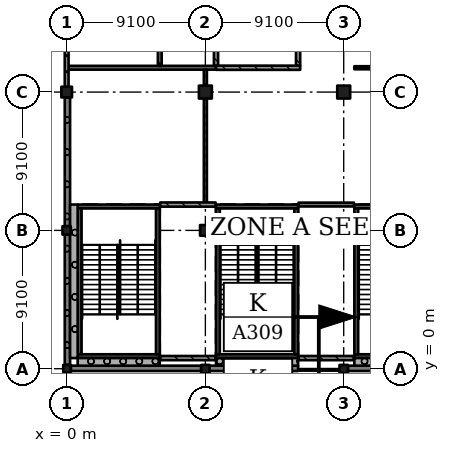
"""IFC4 building model, lengths in metres.
Left out: names, types, materials, properties, quantities, classifications, styles, units other than length and angle.
Written with IfcOpenShell. Run it as: python <this file> out.ifc"""

import sys

from ifc_helpers import new_model, si_unit, direction, frame, frame_2d, origin, origin_with_axes, origin_2d, place, context, subcontext, project, spatial, rectangle, extrude, element, fill, save


model = new_model("IFC4")
c1 = context("Model", 3, precision=1e-05, world=origin(), true_north=direction((0.0, 1.0)))
c2 = subcontext(c1, "Body", "Model", "MODEL_VIEW")
j1 = project(units=[si_unit("LENGTHUNIT", "METRE"), si_unit("PLANEANGLEUNIT", "RADIAN")], contexts=[c1])
p1 = place(None, origin())
s1 = spatial("IfcSite", under=j1, at=p1, CompositionType="ELEMENT")
p2 = place(p1, origin())
s2 = spatial("IfcBuilding", under=s1, at=p2, CompositionType="ELEMENT")
p3 = place(p2, frame((0.0, 0.0, 6.37)))
s3 = spatial("IfcBuildingStorey", under=s2, at=p3, CompositionType="ELEMENT", Elevation=6.37)
p4 = place(p3, origin_with_axes())
e1 = element("IfcColumn", 1, at=p4, inside=s3, PredefinedType="COLUMN", context=c2, shape_type="SweptSolid", body=[
    extrude(rectangle(XDim=0.5, YDim=0.5, at=origin_2d()), origin(), (0.0, 0.0, 1.0), 4.55),
])
p5 = place(p3, frame((-0.025, 9.1, 0.0), z_axis=(0.0, 0.0, 1.0), x_axis=(1.0, 0.0, 0.0)))
e2 = element("IfcColumn", 2, at=p5, inside=s3, PredefinedType="COLUMN", context=c2, shape_type="SweptSolid", body=[
    extrude(rectangle(XDim=0.55, YDim=0.55, at=origin_2d()), origin(), (0.0, 0.0, 1.0), 4.55),
])
p6 = place(p3, frame((-0.025, 18.2, 0.0), z_axis=(0.0, 0.0, 1.0), x_axis=(1.0, 0.0, 0.0)))
e3 = element("IfcColumn", 3, at=p6, inside=s3, PredefinedType="COLUMN", context=c2, shape_type="SweptSolid", body=[
    extrude(rectangle(XDim=0.7, YDim=0.7, at=origin_2d()), origin(), (0.0, 0.0, 1.0), 4.55),
])
p7 = place(p3, frame((9.1, -0.025, 0.0), z_axis=(0.0, 0.0, 1.0), x_axis=(1.0, 0.0, 0.0)))
e4 = element("IfcColumn", 4, at=p7, inside=s3, PredefinedType="COLUMN", context=c2, shape_type="SweptSolid", body=[
    extrude(rectangle(XDim=0.55, YDim=0.55, at=origin_2d()), origin(), (0.0, 0.0, 1.0), 4.55),
])
p8 = place(p3, frame((9.1, 9.1, 0.0), z_axis=(0.0, 0.0, 1.0), x_axis=(1.0, 0.0, 0.0)))
e5 = element("IfcColumn", 5, at=p8, inside=s3, PredefinedType="COLUMN", context=c2, shape_type="SweptSolid", body=[
    extrude(rectangle(XDim=0.7, YDim=0.7, at=origin_2d()), origin(), (0.0, 0.0, 1.0), 4.55),
])
p9 = place(p3, frame((9.1, 18.2, 0.0), z_axis=(0.0, 0.0, 1.0), x_axis=(1.0, 0.0, 0.0)))
e6 = element("IfcColumn", 6, at=p9, inside=s3, PredefinedType="COLUMN", context=c2, shape_type="SweptSolid", body=[
    extrude(rectangle(XDim=0.85, YDim=0.85, at=origin_2d()), origin(), (0.0, 0.0, 1.0), 4.55),
])
p10 = place(p3, frame((18.2, -0.025, 0.0), z_axis=(0.0, 0.0, 1.0), x_axis=(1.0, 0.0, 0.0)))
e7 = element("IfcColumn", 7, at=p10, inside=s3, PredefinedType="COLUMN", context=c2, shape_type="SweptSolid", body=[
    extrude(rectangle(XDim=0.55, YDim=0.55, at=origin_2d()), origin(), (0.0, 0.0, 1.0), 4.55),
])
p11 = place(p3, frame((18.2, 9.1, 0.0), z_axis=(0.0, 0.0, 1.0), x_axis=(1.0, 0.0, 0.0)))
e8 = element("IfcColumn", 8, at=p11, inside=s3, PredefinedType="COLUMN", context=c2, shape_type="SweptSolid", body=[
    extrude(rectangle(XDim=0.7, YDim=0.7, at=origin_2d()), origin(), (0.0, 0.0, 1.0), 4.55),
])
p12 = place(p3, frame((18.2, 18.2, 0.0), z_axis=(0.0, 0.0, 1.0), x_axis=(1.0, 0.0, 0.0)))
e9 = element("IfcColumn", 9, at=p12, inside=s3, PredefinedType="COLUMN", context=c2, shape_type="SweptSolid", body=[
    extrude(rectangle(XDim=0.85, YDim=0.85, at=origin_2d()), origin(), (0.0, 0.0, 1.0), 4.55),
])
p13 = place(p3, frame((6.1, 0.825, 0.0), z_axis=(0.0, 0.0, 1.0), x_axis=(-1.0, 0.0, 0.0)))
e10 = element("IfcWall", 10, at=p13, inside=s3, PredefinedType="SHEAR", context=c2, shape_type="SweptSolid", body=[
    extrude(rectangle(XDim=5.4, YDim=0.25, at=frame_2d((2.7, 0.0))), origin(), (0.0, 0.0, 1.0), 4.55),
])
p14 = place(p3, frame((6.1, 10.675, 0.0), z_axis=(0.0, 0.0, 1.0), x_axis=(-1.0, 0.0, 0.0)))
e11 = element("IfcWall", 11, at=p14, inside=s3, PredefinedType="SHEAR", context=c2, shape_type="SweptSolid", body=[
    extrude(rectangle(XDim=5.4, YDim=0.25, at=frame_2d((2.7, 0.0))), origin(), (0.0, 0.0, 1.0), 4.55),
])
p15 = place(p14, frame((1.5, 0.0, 0.0)))
e12 = element("IfcOpeningElement", 12, at=p15, cuts=e11, PredefinedType="OPENING", context=c2, shape_type="SweptSolid", body=[
    extrude(rectangle(XDim=2.4, YDim=2.1, at=frame_2d((1.2, 1.05))), frame((0.0, 0.135, 0.0), z_axis=(0.0, -1.0, 0.0), x_axis=(1.0, 0.0, 0.0)), (0.0, 0.0, 1.0), 0.27),
])
for number, where, z_axis, x_axis in (
    (13, (0.825, 10.55, 0.0), (0.0, 0.0, 1.0), (0.0, -1.0, 0.0)),
    (14, (5.975, 10.55, 0.0), (0.0, 0.0, 1.0), (0.0, -1.0, 0.0)),
):
    element("IfcWall", number, at=place(p3, frame(where, z_axis=z_axis, x_axis=x_axis)), inside=s3, PredefinedType="SHEAR", context=c2, shape_type="SweptSolid", body=[
        extrude(rectangle(XDim=9.6, YDim=0.25, at=frame_2d((4.8, 0.0))), origin(), (0.0, 0.0, 1.0), 4.55),
    ])
p16 = place(p3, frame((15.2, 0.825, 0.0), z_axis=(0.0, 0.0, 1.0), x_axis=(-1.0, 0.0, 0.0)))
e15 = element("IfcWall", 15, at=p16, inside=s3, PredefinedType="SHEAR", context=c2, shape_type="SweptSolid", body=[
    extrude(rectangle(XDim=5.4, YDim=0.25, at=frame_2d((2.7, 0.0))), origin(), (0.0, 0.0, 1.0), 4.55),
])
p17 = place(p3, frame((15.2, 10.675, 0.0), z_axis=(0.0, 0.0, 1.0), x_axis=(-1.0, 0.0, 0.0)))
e16 = element("IfcWall", 16, at=p17, inside=s3, PredefinedType="SHEAR", context=c2, shape_type="SweptSolid", body=[
    extrude(rectangle(XDim=5.4, YDim=0.25, at=frame_2d((2.7, 0.0))), origin(), (0.0, 0.0, 1.0), 4.55),
])
p18 = place(p17, frame((1.5, 0.0, 0.0)))
e17 = element("IfcOpeningElement", 17, at=p18, cuts=e16, PredefinedType="OPENING", context=c2, shape_type="SweptSolid", body=[
    extrude(rectangle(XDim=2.4, YDim=2.1, at=frame_2d((1.2, 1.05))), frame((0.0, 0.135, 0.0), z_axis=(0.0, -1.0, 0.0), x_axis=(1.0, 0.0, 0.0)), (0.0, 0.0, 1.0), 0.27),
])
for number, where, z_axis, x_axis in (
    (18, (9.925, 10.55, 0.0), (0.0, 0.0, 1.0), (0.0, -1.0, 0.0)),
    (19, (15.075, 10.55, 0.0), (0.0, 0.0, 1.0), (0.0, -1.0, 0.0)),
):
    element("IfcWall", number, at=place(p3, frame(where, z_axis=z_axis, x_axis=x_axis)), inside=s3, PredefinedType="SHEAR", context=c2, shape_type="SweptSolid", body=[
        extrude(rectangle(XDim=9.6, YDim=0.25, at=frame_2d((4.8, 0.0))), origin(), (0.0, 0.0, 1.0), 4.55),
    ])
p19 = place(p3, frame((24.3, 0.825, 0.0), z_axis=(0.0, 0.0, 1.0), x_axis=(-1.0, 0.0, 0.0)))
e20 = element("IfcWall", 20, at=p19, inside=s3, PredefinedType="SHEAR", context=c2, shape_type="SweptSolid", body=[
    extrude(rectangle(XDim=5.4, YDim=0.25, at=frame_2d((2.7, 0.0))), origin(), (0.0, 0.0, 1.0), 4.55),
])
p20 = place(p3, frame((24.3, 10.675, 0.0), z_axis=(0.0, 0.0, 1.0), x_axis=(-1.0, 0.0, 0.0)))
e21 = element("IfcWall", 21, at=p20, inside=s3, PredefinedType="SHEAR", context=c2, shape_type="SweptSolid", body=[
    extrude(rectangle(XDim=5.4, YDim=0.25, at=frame_2d((2.7, 0.0))), origin(), (0.0, 0.0, 1.0), 4.55),
])
p21 = place(p20, frame((1.5, 0.0, 0.0)))
e22 = element("IfcOpeningElement", 22, at=p21, cuts=e21, PredefinedType="OPENING", context=c2, shape_type="SweptSolid", body=[
    extrude(rectangle(XDim=2.4, YDim=2.1, at=frame_2d((1.2, 1.05))), frame((0.0, 0.135, 0.0), z_axis=(0.0, -1.0, 0.0), x_axis=(1.0, 0.0, 0.0)), (0.0, 0.0, 1.0), 0.27),
])
p22 = place(p3, frame((19.025, 10.55, 0.0), z_axis=(0.0, 0.0, 1.0), x_axis=(0.0, -1.0, 0.0)))
e23 = element("IfcWall", 23, at=p22, inside=s3, PredefinedType="SHEAR", context=c2, shape_type="SweptSolid", body=[
    extrude(rectangle(XDim=9.6, YDim=0.25, at=frame_2d((4.8, 0.0))), origin(), (0.0, 0.0, 1.0), 4.55),
])
p23 = place(p3, frame((0.25, 0.025, 0.0), z_axis=(0.0, 0.0, 1.0), x_axis=(1.0, 0.0, 0.0)))
e24 = element("IfcWall", 24, at=p23, inside=s3, PredefinedType="SOLIDWALL", context=c2, shape_type="SweptSolid", body=[
    extrude(rectangle(XDim=8.575, YDim=0.35, at=frame_2d((4.288, 0.0))), origin(), (0.0, 0.0, 1.0), 3.5),
])
p24 = place(p3, frame((9.375, 0.025, 0.0), z_axis=(0.0, 0.0, 1.0), x_axis=(1.0, 0.0, 0.0)))
e25 = element("IfcWall", 25, at=p24, inside=s3, PredefinedType="SOLIDWALL", context=c2, shape_type="SweptSolid", body=[
    extrude(rectangle(XDim=5.825, YDim=0.35, at=frame_2d((2.913, 0.0))), origin(), (0.0, 0.0, 1.0), 3.5),
])
p25 = place(p3, frame((18.475, 0.025, 0.0), z_axis=(0.0, 0.0, 1.0), x_axis=(1.0, 0.0, 0.0)))
e26 = element("IfcWall", 26, at=p25, inside=s3, PredefinedType="SOLIDWALL", context=c2, shape_type="SweptSolid", body=[
    extrude(rectangle(XDim=8.5, YDim=0.35, at=frame_2d((4.25, 0.0))), origin(), (0.0, 0.0, 1.0), 3.5),
])
p26 = place(p3, frame((-0.025, 26.95, 0.0), z_axis=(0.0, 0.0, 1.0), x_axis=(0.0, -1.0, 0.0)))
e27 = element("IfcWall", 27, at=p26, inside=s3, PredefinedType="SOLIDWALL", context=c2, shape_type="SweptSolid", body=[
    extrude(rectangle(XDim=8.4, YDim=0.25, at=frame_2d((4.2, 0.0))), origin(), (0.0, 0.0, 1.0), 3.55),
])
p27 = place(p3, frame((0.025, 17.85, 0.0), z_axis=(0.0, 0.0, 1.0), x_axis=(0.0, -1.0, 0.0)))
e28 = element("IfcWall", 28, at=p27, inside=s3, PredefinedType="SOLIDWALL", context=c2, shape_type="SweptSolid", body=[
    extrude(rectangle(XDim=8.475, YDim=0.35, at=frame_2d((4.238, 0.0))), origin(), (0.0, 0.0, 1.0), 3.5),
])
p28 = place(p3, frame((0.025, 8.825, 0.0), z_axis=(0.0, 0.0, 1.0), x_axis=(0.0, -1.0, 0.0)))
e29 = element("IfcWall", 29, at=p28, inside=s3, PredefinedType="SOLIDWALL", context=c2, shape_type="SweptSolid", body=[
    extrude(rectangle(XDim=8.575, YDim=0.35, at=frame_2d((4.288, 0.0))), origin(), (0.0, 0.0, 1.0), 3.5),
])
p29 = place(p3, frame((0.7, 0.45, 0.0), z_axis=(0.0, 0.0, 1.0), x_axis=(1.0, 0.0, 0.0)))
e30 = element("IfcWall", 30, at=p29, inside=s3, PredefinedType="SOLIDWALL", context=c2, shape_type="SweptSolid", body=[
    extrude(rectangle(XDim=5.4, YDim=0.5, at=frame_2d((2.7, 0.0))), origin(), (0.0, 0.0, 1.0), 4.55),
])
p30 = place(p3, frame((0.45, 0.7, 0.0), z_axis=(0.0, 0.0, 1.0), x_axis=(0.0, 1.0, 0.0)))
e31 = element("IfcWall", 31, at=p30, inside=s3, PredefinedType="SOLIDWALL", context=c2, shape_type="SweptSolid", body=[
    extrude(rectangle(XDim=10.1, YDim=0.5, at=frame_2d((5.05, 0.0))), origin(), (0.0, 0.0, 1.0), 4.25),
])
p31 = place(p3, frame((9.8, 0.45, 0.0), z_axis=(0.0, 0.0, 1.0), x_axis=(1.0, 0.0, 0.0)))
e32 = element("IfcWall", 32, at=p31, inside=s3, PredefinedType="SOLIDWALL", context=c2, shape_type="SweptSolid", body=[
    extrude(rectangle(XDim=5.4, YDim=0.5, at=frame_2d((2.7, 0.0))), origin(), (0.0, 0.0, 1.0), 4.55),
])
p32 = place(p3, frame((18.9, 0.45, 0.0), z_axis=(0.0, 0.0, 1.0), x_axis=(1.0, 0.0, 0.0)))
e33 = element("IfcWall", 33, at=p32, inside=s3, PredefinedType="SOLIDWALL", context=c2, shape_type="SweptSolid", body=[
    extrude(rectangle(XDim=5.4, YDim=0.5, at=frame_2d((2.7, 0.0))), origin(), (0.0, 0.0, 1.0), 4.55),
])
p33 = place(p3, frame((0.1, 19.8, 0.0), z_axis=(0.0, 0.0, 1.0), x_axis=(1.0, 0.0, 0.0)))
e34 = element("IfcWall", 34, at=p33, inside=s3, PredefinedType="SOLIDWALL", context=c2, shape_type="SweptSolid", body=[
    extrude(rectangle(XDim=9.7, YDim=0.25, at=frame_2d((4.85, 0.0))), origin(), (0.0, 0.0, 1.0), 4.25),
])
p34 = place(p33, frame((7.05, 0.0, 0.0)))
e35 = element("IfcOpeningElement", 35, at=p34, cuts=e34, PredefinedType="OPENING", context=c2, shape_type="SweptSolid", body=[
    extrude(rectangle(XDim=1.0, YDim=2.1, at=frame_2d((0.5, 1.05))), frame((0.0, 0.135, 0.0), z_axis=(0.0, -1.0, 0.0), x_axis=(1.0, 0.0, 0.0)), (0.0, 0.0, 1.0), 0.27),
])
p35 = place(p33, frame((2.75, 0.0, 0.0)))
e36 = element("IfcOpeningElement", 36, at=p35, cuts=e34, PredefinedType="OPENING", context=c2, shape_type="SweptSolid", body=[
    extrude(rectangle(XDim=1.0, YDim=2.1, at=frame_2d((0.5, 1.05))), frame((0.0, 0.135, 0.0), z_axis=(0.0, -1.0, 0.0), x_axis=(1.0, 0.0, 0.0)), (0.0, 0.0, 1.0), 0.27),
])
p36 = place(p3, frame((6.1, 29.775, 0.0), z_axis=(0.0, 0.0, 1.0), x_axis=(0.0, -1.0, 0.0)))
e37 = element("IfcWall", 37, at=p36, inside=s3, PredefinedType="SOLIDWALL", context=c2, shape_type="SweptSolid", body=[
    extrude(rectangle(XDim=9.85, YDim=0.25, at=frame_2d((4.925, 0.0))), origin(), (0.0, 0.0, 1.0), 4.25),
])
p37 = place(p3, frame((6.13, 10.8, 0.0), z_axis=(0.0, 0.0, 1.0), x_axis=(1.0, 0.0, 0.0)))
e38 = element("IfcWall", 38, at=p37, inside=s3, PredefinedType="SOLIDWALL", context=c2, shape_type="SweptSolid", body=[
    extrude(rectangle(XDim=3.64, YDim=0.275, at=frame_2d((1.82, 0.0))), origin(), (0.0, 0.0, 1.0), 4.25),
])
p38 = place(p37, frame((0.92, 0.0, 0.0)))
e39 = element("IfcOpeningElement", 39, at=p38, cuts=e38, PredefinedType="OPENING", context=c2, shape_type="SweptSolid", body=[
    extrude(rectangle(XDim=1.2, YDim=2.4, at=frame_2d((0.6, 1.2))), frame((0.0, 0.147, 0.0), z_axis=(0.0, -1.0, 0.0), x_axis=(1.0, 0.0, 0.0)), (0.0, 0.0, 1.0), 0.295),
])
p39 = place(p3, frame((9.1, 17.775, 0.0), z_axis=(0.0, 0.0, 1.0), x_axis=(0.0, -1.0, 0.0)))
e40 = element("IfcWall", 40, at=p39, inside=s3, PredefinedType="PARTITIONING", context=c2, shape_type="SweptSolid", body=[
    extrude(rectangle(XDim=6.837, YDim=0.2, at=frame_2d((3.419, 0.0))), origin(), (0.0, 0.0, 1.0), 3.55),
])
p40 = place(p39, frame((0.85, 0.0, 0.0)))
e41 = element("IfcOpeningElement", 41, at=p40, cuts=e40, PredefinedType="OPENING", context=c2, shape_type="SweptSolid", body=[
    extrude(rectangle(XDim=1.8, YDim=2.4, at=frame_2d((0.9, 1.2))), frame((0.0, 0.11, 0.0), z_axis=(0.0, -1.0, 0.0), x_axis=(1.0, 0.0, 0.0)), (0.0, 0.0, 1.0), 0.22),
])
p41 = place(p39, frame((4.25, 0.0, 0.0)))
e42 = element("IfcOpeningElement", 42, at=p41, cuts=e40, PredefinedType="OPENING", context=c2, shape_type="SweptSolid", body=[
    extrude(rectangle(XDim=1.8, YDim=2.4, at=frame_2d((0.9, 1.2))), frame((0.0, 0.11, 0.0), z_axis=(0.0, -1.0, 0.0), x_axis=(1.0, 0.0, 0.0)), (0.0, 0.0, 1.0), 0.22),
])
p42 = place(p3, frame((9.1, 19.675, 0.0), z_axis=(0.0, 0.0, 1.0), x_axis=(0.0, -1.0, 0.0)))
e43 = element("IfcWall", 43, at=p42, inside=s3, PredefinedType="PARTITIONING", context=c2, shape_type="SweptSolid", body=[
    extrude(rectangle(XDim=1.05, YDim=0.2, at=frame_2d((0.525, 0.0))), origin(), (0.0, 0.0, 1.0), 3.55),
])
p43 = place(p3, frame((9.45, 8.75, 0.0), z_axis=(0.0, 0.0, 1.0), x_axis=(1.0, 0.0, 0.0)))
e44 = element("IfcWall", 44, at=p43, inside=s3, PredefinedType="SOLIDWALL", context=c2, shape_type="SweptSolid", body=[
    extrude(rectangle(XDim=0.32, YDim=0.275, at=frame_2d((0.16, 0.0))), origin(), (0.0, 0.0, 1.0), 4.25),
])
p44 = place(p3, frame((9.77, 0.7, 0.0), z_axis=(0.0, 0.0, 1.0), x_axis=(-1.0, 0.0, 0.0)))
e45 = element("IfcWall", 45, at=p44, inside=s3, PredefinedType="SOLIDWALL", context=c2, shape_type="SweptSolid", body=[
    extrude(rectangle(XDim=3.64, YDim=0.275, at=frame_2d((1.82, 0.0))), origin(), (0.0, 0.0, 1.0), 4.25),
])
p45 = place(p3, frame((9.77, 9.45, 0.0), z_axis=(0.0, 0.0, 1.0), x_axis=(-1.0, 0.0, 0.0)))
e46 = element("IfcWall", 46, at=p45, inside=s3, PredefinedType="SOLIDWALL", context=c2, shape_type="SweptSolid", body=[
    extrude(rectangle(XDim=0.32, YDim=0.275, at=frame_2d((0.16, 0.0))), origin(), (0.0, 0.0, 1.0), 4.25),
])
p46 = place(p3, frame((9.8, 19.8, 0.0), z_axis=(0.0, 0.0, 1.0), x_axis=(1.0, 0.0, 0.0)))
e47 = element("IfcWall", 47, at=p46, inside=s3, PredefinedType="SOLIDWALL", context=c2, shape_type="SweptSolid", body=[
    extrude(rectangle(XDim=5.537, YDim=0.275, at=frame_2d((2.769, 0.0))), origin(), (0.0, 0.0, 1.0), 4.25),
])
p47 = place(p46, frame((2.15, 0.0, 0.0)))
e48 = element("IfcOpeningElement", 48, at=p47, cuts=e47, PredefinedType="OPENING", context=c2, shape_type="SweptSolid", body=[
    extrude(rectangle(XDim=1.2, YDim=2.4, at=frame_2d((0.6, 1.2))), frame((0.0, 0.147, 0.0), z_axis=(0.0, -1.0, 0.0), x_axis=(1.0, 0.0, 0.0)), (0.0, 0.0, 1.0), 0.295),
])
p48 = place(p3, frame((9.8, 19.938, 0.0), z_axis=(0.0, 0.0, 1.0), x_axis=(0.0, 1.0, 0.0)))
e49 = element("IfcWall", 49, at=p48, inside=s3, PredefinedType="SOLIDWALL", context=c2, shape_type="SweptSolid", body=[
    extrude(rectangle(XDim=6.938, YDim=0.275, at=frame_2d((3.469, 0.0))), origin(), (0.0, 0.0, 1.0), 4.25),
])
p49 = place(p3, frame((15.2, 29.762, 0.0), z_axis=(0.0, 0.0, 1.0), x_axis=(0.0, -1.0, 0.0)))
e50 = element("IfcWall", 50, at=p49, inside=s3, PredefinedType="SOLIDWALL", context=c2, shape_type="SweptSolid", body=[
    extrude(rectangle(XDim=9.825, YDim=0.275, at=frame_2d((4.913, 0.0))), origin(), (0.0, 0.0, 1.0), 4.25),
])
p50 = place(p3, frame((18.55, 8.75, 0.0), z_axis=(0.0, 0.0, 1.0), x_axis=(1.0, 0.0, 0.0)))
e51 = element("IfcWall", 51, at=p50, inside=s3, PredefinedType="SOLIDWALL", context=c2, shape_type="SweptSolid", body=[
    extrude(rectangle(XDim=0.32, YDim=0.25, at=frame_2d((0.16, 0.0))), origin(), (0.0, 0.0, 1.0), 4.25),
])
p51 = place(p3, frame((18.87, 0.7, 0.0), z_axis=(0.0, 0.0, 1.0), x_axis=(-1.0, 0.0, 0.0)))
e52 = element("IfcWall", 52, at=p51, inside=s3, PredefinedType="SOLIDWALL", context=c2, shape_type="SweptSolid", body=[
    extrude(rectangle(XDim=3.64, YDim=0.275, at=frame_2d((1.82, 0.0))), origin(), (0.0, 0.0, 1.0), 4.25),
])
p52 = place(p3, frame((18.87, 9.45, 0.0), z_axis=(0.0, 0.0, 1.0), x_axis=(-1.0, 0.0, 0.0)))
e53 = element("IfcWall", 53, at=p52, inside=s3, PredefinedType="SOLIDWALL", context=c2, shape_type="SweptSolid", body=[
    extrude(rectangle(XDim=0.32, YDim=0.25, at=frame_2d((0.16, 0.0))), origin(), (0.0, 0.0, 1.0), 4.25),
])
p53 = place(p3, frame((18.87, 10.8, 0.0), z_axis=(0.0, 0.0, 1.0), x_axis=(-1.0, 0.0, 0.0)))
e54 = element("IfcWall", 54, at=p53, inside=s3, PredefinedType="SOLIDWALL", context=c2, shape_type="SweptSolid", body=[
    extrude(rectangle(XDim=3.64, YDim=0.25, at=frame_2d((1.82, 0.0))), origin(), (0.0, 0.0, 1.0), 4.25),
])
p54 = place(p53, frame((1.35, 0.0, 0.0)))
e55 = element("IfcOpeningElement", 55, at=p54, cuts=e54, PredefinedType="OPENING", context=c2, shape_type="SweptSolid", body=[
    extrude(rectangle(XDim=1.0, YDim=2.1, at=frame_2d((0.5, 1.05))), frame((0.0, 0.135, 0.0), z_axis=(0.0, -1.0, 0.0), x_axis=(1.0, 0.0, 0.0)), (0.0, 0.0, 1.0), 0.27),
])
p55 = place(p3, frame((18.9, 19.8, 0.0), z_axis=(0.0, 0.0, 1.0), x_axis=(1.0, 0.0, 0.0)))
e56 = element("IfcWall", 56, at=p55, inside=s3, PredefinedType="PARTITIONING", context=c2, shape_type="SweptSolid", body=[
    extrude(rectangle(XDim=5.4, YDim=0.2, at=frame_2d((2.7, 0.0))), origin(), (0.0, 0.0, 1.0), 4.25),
])
p56 = place(p55, frame((1.85, 0.0, 0.0)))
e57 = element("IfcOpeningElement", 57, at=p56, cuts=e56, PredefinedType="OPENING", context=c2, shape_type="SweptSolid", body=[
    extrude(rectangle(XDim=1.8, YDim=2.4, at=frame_2d((0.9, 1.2))), frame((0.0, 0.11, 0.0), z_axis=(0.0, -1.0, 0.0), x_axis=(1.0, 0.0, 0.0)), (0.0, 0.0, 1.0), 0.22),
])
p57 = place(p34, origin())
e58 = element("IfcDoor", 58, at=p57, inside=s3, OperationType="SINGLE_SWING_LEFT", PredefinedType="DOOR", context=c2, shape_type="SweptSolid", body=[
    extrude(rectangle(XDim=1.0, YDim=2.1, at=frame_2d((0.5, 1.05))), frame((0.0, 0.025, 0.0), z_axis=(0.0, -1.0, 0.0), x_axis=(1.0, 0.0, 0.0)), (0.0, 0.0, 1.0), 0.05),
])
fill(e35, e58)
p58 = place(p35, origin())
e59 = element("IfcDoor", 59, at=p58, inside=s3, OperationType="SINGLE_SWING_RIGHT", PredefinedType="DOOR", context=c2, shape_type="SweptSolid", body=[
    extrude(rectangle(XDim=1.0, YDim=2.1, at=frame_2d((0.5, 1.05))), frame((0.0, 0.025, 0.0), z_axis=(0.0, -1.0, 0.0), x_axis=(1.0, 0.0, 0.0)), (0.0, 0.0, 1.0), 0.05),
])
fill(e36, e59)
p59 = place(p47, origin())
e60 = element("IfcDoor", 60, at=p59, inside=s3, OperationType="SINGLE_SWING_RIGHT", PredefinedType="DOOR", context=c2, shape_type="SweptSolid", body=[
    extrude(rectangle(XDim=1.2, YDim=2.4, at=frame_2d((0.6, 1.2))), frame((0.0, 0.025, 0.0), z_axis=(0.0, -1.0, 0.0), x_axis=(1.0, 0.0, 0.0)), (0.0, 0.0, 1.0), 0.05),
])
fill(e48, e60)
p60 = place(p38, origin())
e61 = element("IfcDoor", 61, at=p60, inside=s3, OperationType="SINGLE_SWING_RIGHT", PredefinedType="DOOR", context=c2, shape_type="SweptSolid", body=[
    extrude(rectangle(XDim=1.2, YDim=2.4, at=frame_2d((0.6, 1.2))), frame((0.0, 0.025, 0.0), z_axis=(0.0, -1.0, 0.0), x_axis=(1.0, 0.0, 0.0)), (0.0, 0.0, 1.0), 0.05),
])
fill(e39, e61)
p61 = place(p54, origin())
e62 = element("IfcDoor", 62, at=p61, inside=s3, OperationType="SINGLE_SWING_LEFT", PredefinedType="DOOR", context=c2, shape_type="SweptSolid", body=[
    extrude(rectangle(XDim=1.0, YDim=2.1, at=frame_2d((0.5, 1.05))), frame((0.0, 0.025, 0.0), z_axis=(0.0, -1.0, 0.0), x_axis=(1.0, 0.0, 0.0)), (0.0, 0.0, 1.0), 0.05),
])
fill(e55, e62)
p62 = place(p40, origin())
e63 = element("IfcDoor", 63, at=p62, inside=s3, OperationType="DOUBLE_DOOR_SINGLE_SWING", PredefinedType="DOOR", context=c2, shape_type="SweptSolid", body=[
    extrude(rectangle(XDim=1.8, YDim=2.4, at=frame_2d((0.9, 1.2))), frame((0.0, 0.025, 0.0), z_axis=(0.0, -1.0, 0.0), x_axis=(1.0, 0.0, 0.0)), (0.0, 0.0, 1.0), 0.05),
])
fill(e41, e63)
p63 = place(p41, origin())
e64 = element("IfcDoor", 64, at=p63, inside=s3, OperationType="DOUBLE_DOOR_SINGLE_SWING", PredefinedType="DOOR", context=c2, shape_type="SweptSolid", body=[
    extrude(rectangle(XDim=1.8, YDim=2.4, at=frame_2d((0.9, 1.2))), frame((0.0, 0.025, 0.0), z_axis=(0.0, -1.0, 0.0), x_axis=(1.0, 0.0, 0.0)), (0.0, 0.0, 1.0), 0.05),
])
fill(e42, e64)
p64 = place(p15, origin())
e65 = element("IfcDoor", 65, at=p64, inside=s3, OperationType="DOUBLE_DOOR_SINGLE_SWING", PredefinedType="DOOR", context=c2, shape_type="SweptSolid", body=[
    extrude(rectangle(XDim=2.4, YDim=2.1, at=frame_2d((1.2, 1.05))), frame((0.0, 0.025, 0.0), z_axis=(0.0, -1.0, 0.0), x_axis=(1.0, 0.0, 0.0)), (0.0, 0.0, 1.0), 0.05),
])
fill(e12, e65)
p65 = place(p18, origin())
e66 = element("IfcDoor", 66, at=p65, inside=s3, OperationType="DOUBLE_DOOR_SINGLE_SWING", PredefinedType="DOOR", context=c2, shape_type="SweptSolid", body=[
    extrude(rectangle(XDim=2.4, YDim=2.1, at=frame_2d((1.2, 1.05))), frame((0.0, 0.025, 0.0), z_axis=(0.0, -1.0, 0.0), x_axis=(1.0, 0.0, 0.0)), (0.0, 0.0, 1.0), 0.05),
])
fill(e17, e66)
save(model, sys.argv[1])
